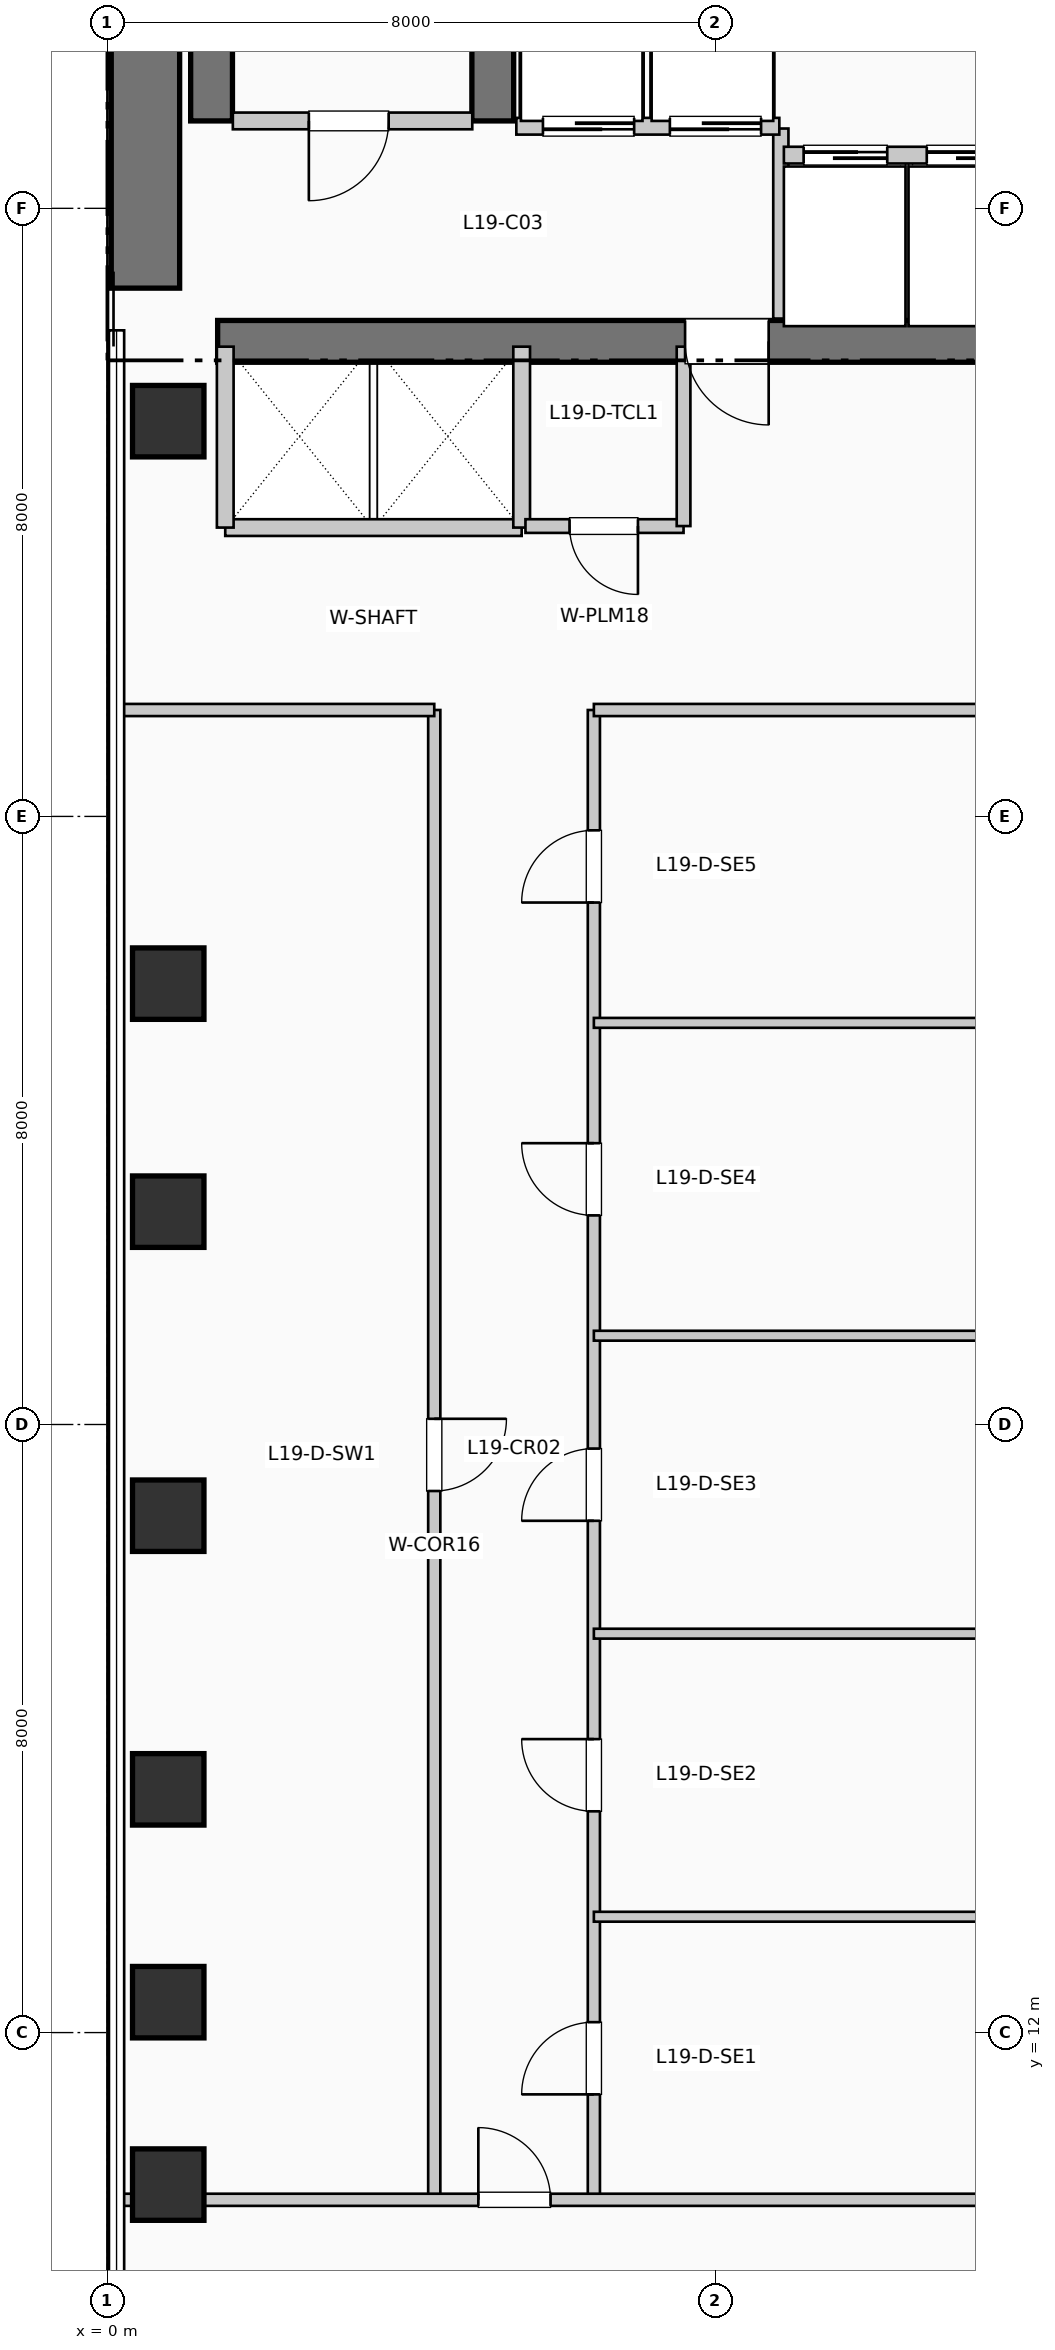
"""IFC4 building model, lengths in metres.
Left out: names, types, materials, properties, quantities, classifications, styles, units other than length and angle.
Written with IfcOpenShell. Run it as: python <this file> out.ifc"""

import sys

from ifc_helpers import new_model, si_unit, direction, frame, frame_2d, origin, origin_2d, place, context, subcontext, project, spatial, rectangle, extrude, element, fill, save


model = new_model("IFC4")
c1 = context("Model", 3, precision=1e-05, world=origin(), true_north=direction((0.0, 1.0)))
c2 = subcontext(c1, "Body", "Model", "MODEL_VIEW")
j1 = project(units=[si_unit("LENGTHUNIT", "METRE"), si_unit("PLANEANGLEUNIT", "RADIAN")], contexts=[c1])
p1 = place(None, origin())
s1 = spatial("IfcSite", under=j1, at=p1, CompositionType="ELEMENT")
p2 = place(p1, origin())
s2 = spatial("IfcBuilding", under=s1, at=p2, CompositionType="ELEMENT")
p3 = place(p2, frame((0.0, 0.0, 81.84)))
s3 = spatial("IfcBuildingStorey", under=s2, at=p3, CompositionType="ELEMENT", Elevation=81.84)
p4 = place(p3, frame((0.5, 34.95, 0.0), z_axis=(0.0, 0.0, 1.0), x_axis=(0.0, 1.0, 0.0)))
e1 = element("IfcWall", 1, at=p4, inside=s3, PredefinedType="SHEAR", context=c2, shape_type="SweptSolid", body=[
    extrude(rectangle(XDim=7.9, YDim=0.9, at=frame_2d((3.95, 0.0))), origin(), (0.0, 0.0, 1.0), 3.96),
])
p5 = place(p3, frame((1.45, 34.25, 0.0), z_axis=(0.0, 0.0, 1.0), x_axis=(1.0, 0.0, 0.0)))
e2 = element("IfcWall", 2, at=p5, inside=s3, PredefinedType="SHEAR", context=c2, shape_type="SweptSolid", body=[
    extrude(rectangle(XDim=10.71, YDim=0.55, at=frame_2d((5.355, 0.0))), origin(), (0.0, 0.0, 1.0), 3.96),
])
p6 = place(p5, frame((7.25, 0.0, 0.0), z_axis=(0.0, 0.0, 1.0), x_axis=(-1.0, 0.0, 0.0)))
e3 = element("IfcOpeningElement", 3, at=p6, cuts=e2, PredefinedType="OPENING", context=c2, shape_type="SweptSolid", body=[
    extrude(rectangle(XDim=1.1, YDim=2.15, at=frame_2d((0.55, 1.075))), frame((0.0, 0.285, 0.0), z_axis=(0.0, -1.0, 0.0), x_axis=(1.0, 0.0, 0.0)), (0.0, 0.0, 1.0), 0.57),
])
for number, where, z_axis, x_axis in (
    (4, (1.37, 37.15, 0.0), (0.0, 0.0, 1.0), (0.0, 1.0, 0.0)),
    (5, (5.07, 37.15, 0.0), (0.0, 0.0, 1.0), (0.0, 1.0, 0.0)),
):
    element("IfcWall", number, at=place(p3, frame(where, z_axis=z_axis, x_axis=x_axis)), inside=s3, PredefinedType="SHEAR", context=c2, shape_type="SweptSolid", body=[
        extrude(rectangle(XDim=7.89, YDim=0.55, at=frame_2d((3.945, 0.0))), origin(), (0.0, 0.0, 1.0), 3.96),
    ])
for number, where, z_axis, x_axis in (
    (6, (0.8, 10.0, 0.0), (0.0, 0.0, 1.0), (1.0, 0.0, 0.0)),
    (7, (0.8, 12.4, 0.0), (0.0, 0.0, 1.0), (1.0, 0.0, 0.0)),
    (8, (0.8, 15.2, 0.0), (0.0, 0.0, 1.0), (1.0, 0.0, 0.0)),
    (9, (0.8, 18.8, 0.0), (0.0, 0.0, 1.0), (1.0, 0.0, 0.0)),
    (10, (0.8, 22.8, 0.0), (0.0, 0.0, 1.0), (1.0, 0.0, 0.0)),
    (11, (0.8, 25.8, 0.0), (0.0, 0.0, 1.0), (1.0, 0.0, 0.0)),
    (12, (0.8, 33.2, 0.0), (0.0, 0.0, 1.0), (1.0, 0.0, 0.0)),
):
    element("IfcColumn", number, at=place(p3, frame(where, z_axis=z_axis, x_axis=x_axis)), inside=s3, PredefinedType="COLUMN", context=c2, shape_type="SweptSolid", body=[
        extrude(rectangle(XDim=0.94, YDim=0.94, at=origin_2d()), origin(), (0.0, 0.0, 1.0), 3.96),
    ])
p7 = place(p3, frame((1.65, 37.15, 0.0), z_axis=(0.0, 0.0, 1.0), x_axis=(1.0, 0.0, 0.0)))
e13 = element("IfcWall", 13, at=p7, inside=s3, PredefinedType="PARTITIONING", context=c2, shape_type="SweptSolid", body=[
    extrude(rectangle(XDim=3.15, YDim=0.22, at=frame_2d((1.575, 0.0))), origin(), (0.0, 0.0, 1.0), 3.71),
])
p8 = place(p7, frame((2.05, 0.0, 0.0), z_axis=(0.0, 0.0, 1.0), x_axis=(-1.0, 0.0, 0.0)))
e14 = element("IfcOpeningElement", 14, at=p8, cuts=e13, PredefinedType="OPENING", context=c2, shape_type="SweptSolid", body=[
    extrude(rectangle(XDim=1.05, YDim=2.15, at=frame_2d((0.525, 1.075))), frame((0.0, 0.12, 0.0), z_axis=(0.0, -1.0, 0.0), x_axis=(1.0, 0.0, 0.0)), (0.0, 0.0, 1.0), 0.24),
])
p9 = place(p3, frame((8.86, 34.55, 0.0), z_axis=(0.0, 0.0, 1.0), x_axis=(0.0, 1.0, 0.0)))
e15 = element("IfcWall", 15, at=p9, inside=s3, PredefinedType="PARTITIONING", context=c2, shape_type="SweptSolid", body=[
    extrude(rectangle(XDim=2.5, YDim=0.2, at=frame_2d((1.25, 0.0))), origin(), (0.0, 0.0, 1.0), 3.71),
])
p10 = place(p3, frame((5.38, 37.08, 0.0), z_axis=(0.0, 0.0, 1.0), x_axis=(1.0, 0.0, 0.0)))
e16 = element("IfcWall", 16, at=p10, inside=s3, PredefinedType="PARTITIONING", context=c2, shape_type="SweptSolid", body=[
    extrude(rectangle(XDim=3.46, YDim=0.22, at=frame_2d((1.73, 0.0))), origin(), (0.0, 0.0, 1.0), 3.71),
])
p11 = place(p10, frame((1.55, 0.0, 0.0), z_axis=(0.0, 0.0, 1.0), x_axis=(-1.0, 0.0, 0.0)))
e17 = element("IfcOpeningElement", 17, at=p11, cuts=e16, PredefinedType="OPENING", context=c2, shape_type="SweptSolid", body=[
    extrude(rectangle(XDim=1.2, YDim=2.2, at=frame_2d((0.6, 1.1))), frame((0.0, 0.12, 0.0), z_axis=(0.0, -1.0, 0.0), x_axis=(1.0, 0.0, 0.0)), (0.0, 0.0, 1.0), 0.24),
])
p12 = place(p10, frame((3.22, 0.0, 0.0), z_axis=(0.0, 0.0, 1.0), x_axis=(-1.0, 0.0, 0.0)))
e18 = element("IfcOpeningElement", 18, at=p12, cuts=e16, PredefinedType="OPENING", context=c2, shape_type="SweptSolid", body=[
    extrude(rectangle(XDim=1.2, YDim=2.2, at=frame_2d((0.6, 1.1))), frame((0.0, 0.12, 0.0), z_axis=(0.0, -1.0, 0.0), x_axis=(1.0, 0.0, 0.0)), (0.0, 0.0, 1.0), 0.24),
])
p13 = place(p3, frame((1.55, 31.8, 0.0), z_axis=(0.0, 0.0, 1.0), x_axis=(1.0, 0.0, 0.0)))
e19 = element("IfcWall", 19, at=p13, inside=s3, PredefinedType="PARTITIONING", context=c2, shape_type="SweptSolid", body=[
    extrude(rectangle(XDim=3.9, YDim=0.22, at=frame_2d((1.95, 0.0))), origin(), (0.0, 0.0, 1.0), 3.71),
])
for number, where, z_axis, x_axis in (
    (20, (1.55, 31.8, 0.0), (0.0, 0.0, 1.0), (0.0, 1.0, 0.0)),
    (21, (5.45, 31.8, 0.0), (0.0, 0.0, 1.0), (0.0, 1.0, 0.0)),
):
    element("IfcWall", number, at=place(p3, frame(where, z_axis=z_axis, x_axis=x_axis)), inside=s3, PredefinedType="PARTITIONING", context=c2, shape_type="SweptSolid", body=[
        extrude(rectangle(XDim=2.38, YDim=0.22, at=frame_2d((1.19, 0.0))), origin(), (0.0, 0.0, 1.0), 3.71),
    ])
p14 = place(p3, frame((5.5, 31.82, 0.0), z_axis=(0.0, 0.0, 1.0), x_axis=(1.0, 0.0, 0.0)))
e22 = element("IfcWall", 22, at=p14, inside=s3, PredefinedType="PLUMBINGWALL", context=c2, shape_type="SweptSolid", body=[
    extrude(rectangle(XDim=2.08, YDim=0.18, at=frame_2d((1.04, 0.0))), origin(), (0.0, 0.0, 1.0), 3.71),
])
p15 = place(p14, frame((1.48, 0.0, 0.0), z_axis=(0.0, 0.0, 1.0), x_axis=(-1.0, 0.0, 0.0)))
e23 = element("IfcOpeningElement", 23, at=p15, cuts=e22, PredefinedType="OPENING", context=c2, shape_type="SweptSolid", body=[
    extrude(rectangle(XDim=0.9, YDim=2.1, at=frame_2d((0.45, 1.05))), frame((0.0, 0.1, 0.0), z_axis=(0.0, -1.0, 0.0), x_axis=(1.0, 0.0, 0.0)), (0.0, 0.0, 1.0), 0.2),
])
p16 = place(p3, frame((7.58, 31.82, 0.0), z_axis=(0.0, 0.0, 1.0), x_axis=(0.0, 1.0, 0.0)))
e24 = element("IfcWall", 24, at=p16, inside=s3, PredefinedType="PLUMBINGWALL", context=c2, shape_type="SweptSolid", body=[
    extrude(rectangle(XDim=2.36, YDim=0.18, at=frame_2d((1.18, 0.0))), origin(), (0.0, 0.0, 1.0), 3.71),
])
p17 = place(p3, frame((8.9, 36.7, 0.0), z_axis=(0.0, 0.0, 1.0), x_axis=(1.0, 0.0, 0.0)))
e25 = element("IfcWall", 25, at=p17, inside=s3, PredefinedType="PARTITIONING", context=c2, shape_type="SweptSolid", body=[
    extrude(rectangle(XDim=3.26, YDim=0.22, at=frame_2d((1.63, 0.0))), origin(), (0.0, 0.0, 1.0), 3.71),
])
p18 = place(p17, frame((0.26, 0.0, 0.0)))
e26 = element("IfcOpeningElement", 26, at=p18, cuts=e25, PredefinedType="OPENING", context=c2, shape_type="SweptSolid", body=[
    extrude(rectangle(XDim=1.1, YDim=2.2, at=frame_2d((0.55, 1.1))), frame((0.0, 0.12, 0.0), z_axis=(0.0, -1.0, 0.0), x_axis=(1.0, 0.0, 0.0)), (0.0, 0.0, 1.0), 0.24),
])
p19 = place(p17, frame((1.88, 0.0, 0.0)))
e27 = element("IfcOpeningElement", 27, at=p19, cuts=e25, PredefinedType="OPENING", context=c2, shape_type="SweptSolid", body=[
    extrude(rectangle(XDim=1.1, YDim=2.2, at=frame_2d((0.55, 1.1))), frame((0.0, 0.12, 0.0), z_axis=(0.0, -1.0, 0.0), x_axis=(1.0, 0.0, 0.0)), (0.0, 0.0, 1.0), 0.24),
])
p20 = place(p3, frame((4.3, 9.8, 0.0), z_axis=(0.0, 0.0, 1.0), x_axis=(0.0, 1.0, 0.0)))
e28 = element("IfcWall", 28, at=p20, inside=s3, PredefinedType="PARTITIONING", context=c2, shape_type="SweptSolid", body=[
    extrude(rectangle(XDim=19.6, YDim=0.16, at=frame_2d((9.8, 0.0))), origin(), (0.0, 0.0, 1.0), 3.71),
])
p21 = place(p20, frame((10.275, 0.0, 0.0), z_axis=(0.0, 0.0, 1.0), x_axis=(-1.0, 0.0, 0.0)))
e29 = element("IfcOpeningElement", 29, at=p21, cuts=e28, PredefinedType="OPENING", context=c2, shape_type="SweptSolid", body=[
    extrude(rectangle(XDim=0.95, YDim=2.15, at=frame_2d((0.475, 1.075))), frame((0.0, 0.09, 0.0), z_axis=(0.0, -1.0, 0.0), x_axis=(1.0, 0.0, 0.0)), (0.0, 0.0, 1.0), 0.18),
])
p22 = place(p3, frame((6.4, 9.8, 0.0), z_axis=(0.0, 0.0, 1.0), x_axis=(0.0, 1.0, 0.0)))
e30 = element("IfcWall", 30, at=p22, inside=s3, PredefinedType="PARTITIONING", context=c2, shape_type="SweptSolid", body=[
    extrude(rectangle(XDim=19.6, YDim=0.16, at=frame_2d((9.8, 0.0))), origin(), (0.0, 0.0, 1.0), 3.71),
])
p23 = place(p22, frame((1.387, 0.0, 0.0)))
e31 = element("IfcOpeningElement", 31, at=p23, cuts=e30, PredefinedType="OPENING", context=c2, shape_type="SweptSolid", body=[
    extrude(rectangle(XDim=0.95, YDim=2.15, at=frame_2d((0.475, 1.075))), frame((0.0, 0.09, 0.0), z_axis=(0.0, -1.0, 0.0), x_axis=(1.0, 0.0, 0.0)), (0.0, 0.0, 1.0), 0.18),
])
p24 = place(p22, frame((5.111, 0.0, 0.0)))
e32 = element("IfcOpeningElement", 32, at=p24, cuts=e30, PredefinedType="OPENING", context=c2, shape_type="SweptSolid", body=[
    extrude(rectangle(XDim=0.95, YDim=2.15, at=frame_2d((0.475, 1.075))), frame((0.0, 0.09, 0.0), z_axis=(0.0, -1.0, 0.0), x_axis=(1.0, 0.0, 0.0)), (0.0, 0.0, 1.0), 0.18),
])
p25 = place(p22, frame((8.933, 0.0, 0.0)))
e33 = element("IfcOpeningElement", 33, at=p25, cuts=e30, PredefinedType="OPENING", context=c2, shape_type="SweptSolid", body=[
    extrude(rectangle(XDim=0.95, YDim=2.15, at=frame_2d((0.475, 1.075))), frame((0.0, 0.09, 0.0), z_axis=(0.0, -1.0, 0.0), x_axis=(1.0, 0.0, 0.0)), (0.0, 0.0, 1.0), 0.18),
])
p26 = place(p22, frame((12.951, 0.0, 0.0)))
e34 = element("IfcOpeningElement", 34, at=p26, cuts=e30, PredefinedType="OPENING", context=c2, shape_type="SweptSolid", body=[
    extrude(rectangle(XDim=0.95, YDim=2.15, at=frame_2d((0.475, 1.075))), frame((0.0, 0.09, 0.0), z_axis=(0.0, -1.0, 0.0), x_axis=(1.0, 0.0, 0.0)), (0.0, 0.0, 1.0), 0.18),
])
p27 = place(p22, frame((17.067, 0.0, 0.0)))
e35 = element("IfcOpeningElement", 35, at=p27, cuts=e30, PredefinedType="OPENING", context=c2, shape_type="SweptSolid", body=[
    extrude(rectangle(XDim=0.95, YDim=2.15, at=frame_2d((0.475, 1.075))), frame((0.0, 0.09, 0.0), z_axis=(0.0, -1.0, 0.0), x_axis=(1.0, 0.0, 0.0)), (0.0, 0.0, 1.0), 0.18),
])
p28 = place(p3, frame((0.19, 9.8, 0.0), z_axis=(0.0, 0.0, 1.0), x_axis=(1.0, 0.0, 0.0)))
e36 = element("IfcWall", 36, at=p28, inside=s3, PredefinedType="PARTITIONING", context=c2, shape_type="SweptSolid", body=[
    extrude(rectangle(XDim=23.26, YDim=0.16, at=frame_2d((11.63, 0.0))), origin(), (0.0, 0.0, 1.0), 2.995),
])
p29 = place(p28, frame((4.69, 0.0, 0.0)))
e37 = element("IfcOpeningElement", 37, at=p29, cuts=e36, PredefinedType="OPENING", context=c2, shape_type="SweptSolid", body=[
    extrude(rectangle(XDim=0.95, YDim=2.15, at=frame_2d((0.475, 1.075))), frame((0.0, 0.09, 0.0), z_axis=(0.0, -1.0, 0.0), x_axis=(1.0, 0.0, 0.0)), (0.0, 0.0, 1.0), 0.18),
])
p30 = place(p3, frame((0.19, 29.4, 0.0), z_axis=(0.0, 0.0, 1.0), x_axis=(1.0, 0.0, 0.0)))
e38 = element("IfcWall", 38, at=p30, inside=s3, PredefinedType="PARTITIONING", context=c2, shape_type="SweptSolid", body=[
    extrude(rectangle(XDim=4.11, YDim=0.16, at=frame_2d((2.055, 0.0))), origin(), (0.0, 0.0, 1.0), 3.365),
])
p31 = place(p3, frame((6.4, 29.4, 0.0), z_axis=(0.0, 0.0, 1.0), x_axis=(1.0, 0.0, 0.0)))
e39 = element("IfcWall", 39, at=p31, inside=s3, PredefinedType="PARTITIONING", context=c2, shape_type="SweptSolid", body=[
    extrude(rectangle(XDim=17.05, YDim=0.16, at=frame_2d((8.525, 0.0))), origin(), (0.0, 0.0, 1.0), 3.365),
])
for number, where, z_axis, x_axis in (
    (40, (6.4, 13.524, 0.0), (0.0, 0.0, 1.0), (1.0, 0.0, 0.0)),
    (41, (6.4, 17.248, 0.0), (0.0, 0.0, 1.0), (1.0, 0.0, 0.0)),
    (42, (6.4, 21.168, 0.0), (0.0, 0.0, 1.0), (1.0, 0.0, 0.0)),
    (43, (6.4, 25.284, 0.0), (0.0, 0.0, 1.0), (1.0, 0.0, 0.0)),
):
    element("IfcWall", number, at=place(p3, frame(where, z_axis=z_axis, x_axis=x_axis)), inside=s3, PredefinedType="PARTITIONING", context=c2, shape_type="SweptSolid", body=[
        extrude(rectangle(XDim=17.05, YDim=0.13, at=frame_2d((8.525, 0.0))), origin(), (0.0, 0.0, 1.0), 3.71),
    ])
p32 = place(p8, origin())
e44 = element("IfcDoor", 44, at=p32, inside=s3, OperationType="SINGLE_SWING_LEFT", PredefinedType="DOOR", context=c2, shape_type="SweptSolid", body=[
    extrude(rectangle(XDim=1.05, YDim=2.15, at=frame_2d((0.525, 1.075))), frame((0.0, 0.025, 0.0), z_axis=(0.0, -1.0, 0.0), x_axis=(1.0, 0.0, 0.0)), (0.0, 0.0, 1.0), 0.05),
])
fill(e14, e44)
p33 = place(p6, origin())
e45 = element("IfcDoor", 45, at=p33, inside=s3, OperationType="SINGLE_SWING_RIGHT", PredefinedType="DOOR", context=c2, shape_type="SweptSolid", body=[
    extrude(rectangle(XDim=1.1, YDim=2.15, at=frame_2d((0.55, 1.075))), frame((0.0, 0.025, 0.0), z_axis=(0.0, -1.0, 0.0), x_axis=(1.0, 0.0, 0.0)), (0.0, 0.0, 1.0), 0.05),
])
fill(e3, e45)
p34 = place(p11, origin())
e46 = element("IfcDoor", 46, at=p34, inside=s3, OperationType="SLIDING_TO_RIGHT", PredefinedType="DOOR", context=c2, shape_type="SweptSolid", body=[
    extrude(rectangle(XDim=1.2, YDim=2.2, at=frame_2d((0.6, 1.1))), frame((0.0, 0.025, 0.0), z_axis=(0.0, -1.0, 0.0), x_axis=(1.0, 0.0, 0.0)), (0.0, 0.0, 1.0), 0.05),
])
fill(e17, e46)
p35 = place(p12, origin())
e47 = element("IfcDoor", 47, at=p35, inside=s3, OperationType="SLIDING_TO_RIGHT", PredefinedType="DOOR", context=c2, shape_type="SweptSolid", body=[
    extrude(rectangle(XDim=1.2, YDim=2.2, at=frame_2d((0.6, 1.1))), frame((0.0, 0.025, 0.0), z_axis=(0.0, -1.0, 0.0), x_axis=(1.0, 0.0, 0.0)), (0.0, 0.0, 1.0), 0.05),
])
fill(e18, e47)
p36 = place(p15, origin())
e48 = element("IfcDoor", 48, at=p36, inside=s3, OperationType="SINGLE_SWING_RIGHT", PredefinedType="DOOR", context=c2, shape_type="SweptSolid", body=[
    extrude(rectangle(XDim=0.9, YDim=2.1, at=frame_2d((0.45, 1.05))), frame((0.0, 0.025, 0.0), z_axis=(0.0, -1.0, 0.0), x_axis=(1.0, 0.0, 0.0)), (0.0, 0.0, 1.0), 0.05),
])
fill(e23, e48)
p37 = place(p18, origin())
e49 = element("IfcDoor", 49, at=p37, inside=s3, OperationType="SLIDING_TO_LEFT", PredefinedType="DOOR", context=c2, shape_type="SweptSolid", body=[
    extrude(rectangle(XDim=1.1, YDim=2.2, at=frame_2d((0.55, 1.1))), frame((0.0, 0.025, 0.0), z_axis=(0.0, -1.0, 0.0), x_axis=(1.0, 0.0, 0.0)), (0.0, 0.0, 1.0), 0.05),
])
fill(e26, e49)
p38 = place(p19, origin())
e50 = element("IfcDoor", 50, at=p38, inside=s3, OperationType="SLIDING_TO_LEFT", PredefinedType="DOOR", context=c2, shape_type="SweptSolid", body=[
    extrude(rectangle(XDim=1.1, YDim=2.2, at=frame_2d((0.55, 1.1))), frame((0.0, 0.025, 0.0), z_axis=(0.0, -1.0, 0.0), x_axis=(1.0, 0.0, 0.0)), (0.0, 0.0, 1.0), 0.05),
])
fill(e27, e50)
p39 = place(p29, origin())
e51 = element("IfcDoor", 51, at=p39, inside=s3, OperationType="SINGLE_SWING_LEFT", PredefinedType="DOOR", context=c2, shape_type="SweptSolid", body=[
    extrude(rectangle(XDim=0.95, YDim=2.15, at=frame_2d((0.475, 1.075))), frame((0.0, 0.025, 0.0), z_axis=(0.0, -1.0, 0.0), x_axis=(1.0, 0.0, 0.0)), (0.0, 0.0, 1.0), 0.05),
])
fill(e37, e51)
p40 = place(p21, origin())
e52 = element("IfcDoor", 52, at=p40, inside=s3, OperationType="SINGLE_SWING_RIGHT", PredefinedType="DOOR", context=c2, shape_type="SweptSolid", body=[
    extrude(rectangle(XDim=0.95, YDim=2.15, at=frame_2d((0.475, 1.075))), frame((0.0, 0.025, 0.0), z_axis=(0.0, -1.0, 0.0), x_axis=(1.0, 0.0, 0.0)), (0.0, 0.0, 1.0), 0.05),
])
fill(e29, e52)
p41 = place(p23, origin())
e53 = element("IfcDoor", 53, at=p41, inside=s3, OperationType="SINGLE_SWING_LEFT", PredefinedType="DOOR", context=c2, shape_type="SweptSolid", body=[
    extrude(rectangle(XDim=0.95, YDim=2.15, at=frame_2d((0.475, 1.075))), frame((0.0, 0.025, 0.0), z_axis=(0.0, -1.0, 0.0), x_axis=(1.0, 0.0, 0.0)), (0.0, 0.0, 1.0), 0.05),
])
fill(e31, e53)
p42 = place(p24, origin())
e54 = element("IfcDoor", 54, at=p42, inside=s3, OperationType="SINGLE_SWING_RIGHT", PredefinedType="DOOR", context=c2, shape_type="SweptSolid", body=[
    extrude(rectangle(XDim=0.95, YDim=2.15, at=frame_2d((0.475, 1.075))), frame((0.0, 0.025, 0.0), z_axis=(0.0, -1.0, 0.0), x_axis=(1.0, 0.0, 0.0)), (0.0, 0.0, 1.0), 0.05),
])
fill(e32, e54)
p43 = place(p25, origin())
e55 = element("IfcDoor", 55, at=p43, inside=s3, OperationType="SINGLE_SWING_LEFT", PredefinedType="DOOR", context=c2, shape_type="SweptSolid", body=[
    extrude(rectangle(XDim=0.95, YDim=2.15, at=frame_2d((0.475, 1.075))), frame((0.0, 0.025, 0.0), z_axis=(0.0, -1.0, 0.0), x_axis=(1.0, 0.0, 0.0)), (0.0, 0.0, 1.0), 0.05),
])
fill(e33, e55)
p44 = place(p26, origin())
e56 = element("IfcDoor", 56, at=p44, inside=s3, OperationType="SINGLE_SWING_RIGHT", PredefinedType="DOOR", context=c2, shape_type="SweptSolid", body=[
    extrude(rectangle(XDim=0.95, YDim=2.15, at=frame_2d((0.475, 1.075))), frame((0.0, 0.025, 0.0), z_axis=(0.0, -1.0, 0.0), x_axis=(1.0, 0.0, 0.0)), (0.0, 0.0, 1.0), 0.05),
])
fill(e34, e56)
p45 = place(p27, origin())
e57 = element("IfcDoor", 57, at=p45, inside=s3, OperationType="SINGLE_SWING_LEFT", PredefinedType="DOOR", context=c2, shape_type="SweptSolid", body=[
    extrude(rectangle(XDim=0.95, YDim=2.15, at=frame_2d((0.475, 1.075))), frame((0.0, 0.025, 0.0), z_axis=(0.0, -1.0, 0.0), x_axis=(1.0, 0.0, 0.0)), (0.0, 0.0, 1.0), 0.05),
])
fill(e35, e57)
save(model, sys.argv[1])
